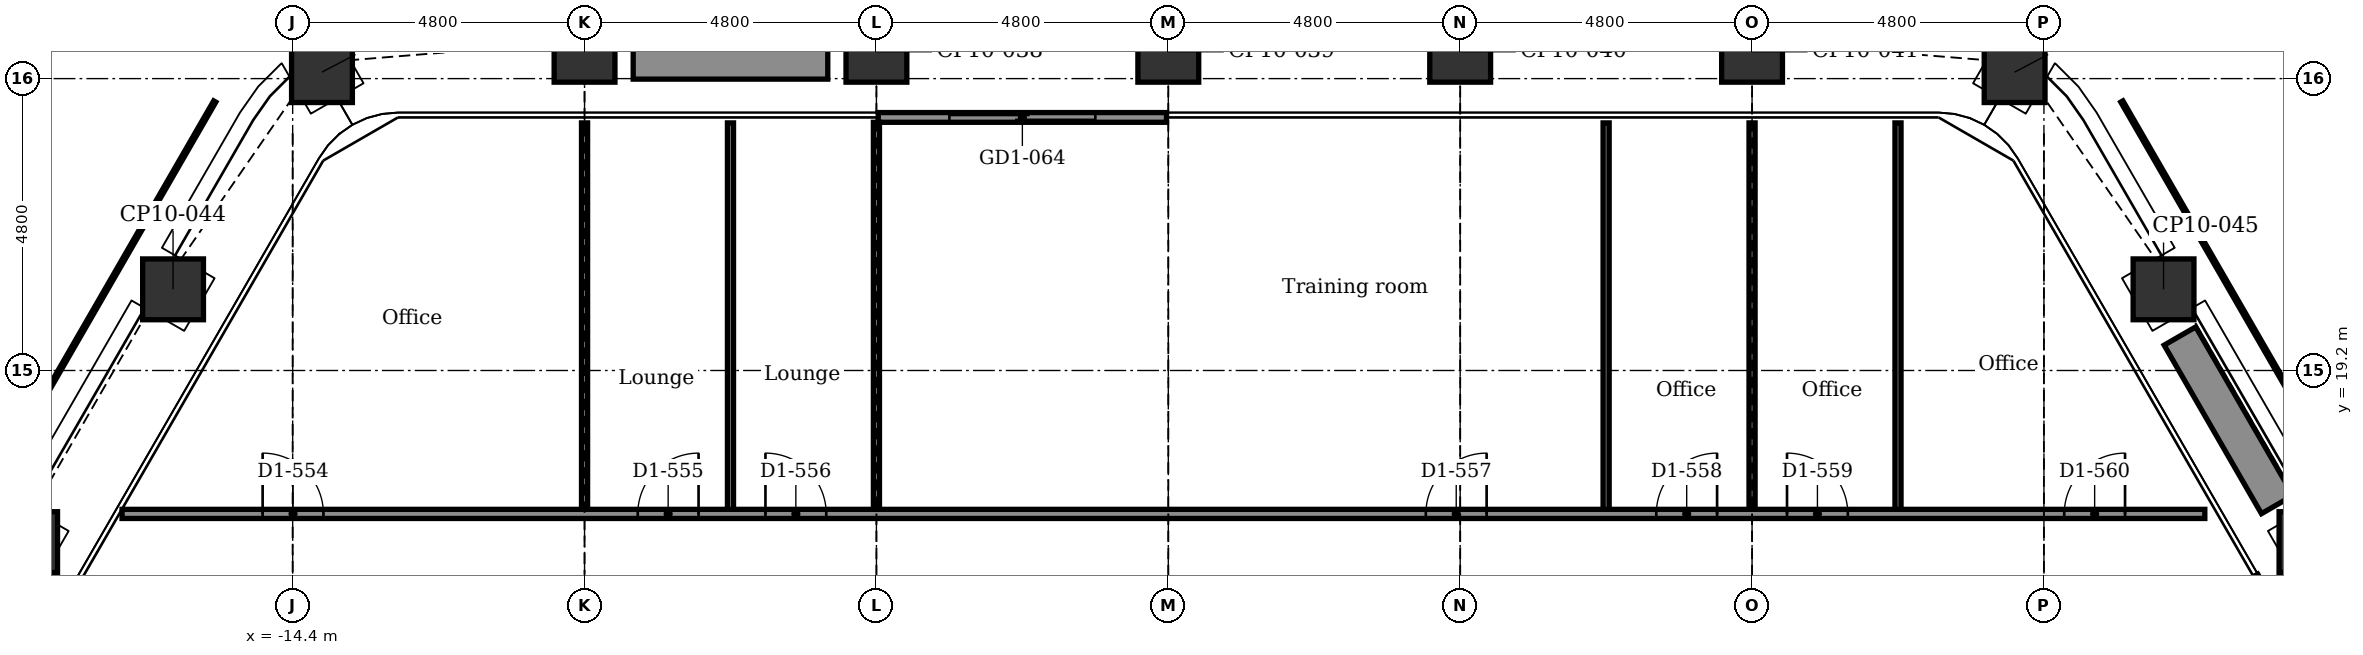
"""IFC4 building model, lengths in metres.
Left out: names, types, materials, properties, quantities, classifications, styles, units other than length and angle.
Written with IfcOpenShell. Run it as: python <this file> out.ifc"""

import sys

from ifc_helpers import new_model, si_unit, direction, frame, frame_2d, origin, origin_2d, place, context, subcontext, project, spatial, rectangle, extrude, element, fill, save


model = new_model("IFC4")
c1 = context("Model", 3, precision=1e-05, world=origin(), true_north=direction((0.0, 1.0)))
c2 = subcontext(c1, "Body", "Model", "MODEL_VIEW")
j1 = project(units=[si_unit("LENGTHUNIT", "METRE"), si_unit("PLANEANGLEUNIT", "RADIAN")], contexts=[c1])
p1 = place(None, origin())
s1 = spatial("IfcSite", under=j1, at=p1, CompositionType="ELEMENT")
p2 = place(p1, origin())
s2 = spatial("IfcBuilding", under=s1, at=p2, CompositionType="ELEMENT")
p3 = place(p2, frame((0.0, 0.0, 197.3)))
s3 = spatial("IfcBuildingStorey", under=s2, at=p3, CompositionType="ELEMENT", Elevation=197.3)
for number, where, z_axis, x_axis in (
    (1, (-13.918, 24.107, -0.15), (0.0, 0.0, 1.0), (0.866, 0.5, 0.0)),
    (2, (-9.6, 24.442, -0.15), (0.0, 0.0, 1.0), (1.0, 0.0, 0.0)),
    (3, (-4.8, 24.442, -0.15), (0.0, 0.0, 1.0), (1.0, 0.0, 0.0)),
    (4, (0.0, 24.442, -0.15), (0.0, 0.0, 1.0), (1.0, 0.0, 0.0)),
    (5, (4.8, 24.442, -0.15), (0.0, 0.0, 1.0), (1.0, 0.0, 0.0)),
    (6, (9.6, 24.442, -0.15), (0.0, 0.0, 1.0), (1.0, 0.0, 0.0)),
    (7, (13.918, 24.107, -0.15), (0.0, 0.0, 1.0), (0.5, 0.866, 0.0)),
    (8, (16.367, 20.535, -0.15), (0.0, 0.0, 1.0), (0.866, 0.5, 0.0)),
    (9, (18.767, 16.378, -0.15), (0.0, 0.0, 1.0), (0.866, 0.5, 0.0)),
    (10, (-18.767, 16.378, -0.15), (0.0, 0.0, 1.0), (0.5, 0.866, 0.0)),
    (11, (-16.367, 20.535, -0.15), (0.0, 0.0, 1.0), (0.5, 0.866, 0.0)),
):
    element("IfcColumn", number, at=place(p3, frame(where, z_axis=z_axis, x_axis=x_axis)), inside=s3, PredefinedType="COLUMN", context=c2, shape_type="SweptSolid", body=[
        extrude(rectangle(XDim=1.0, YDim=1.0, at=origin_2d()), origin(), (0.0, 0.0, 1.0), 3.9),
    ])
p4 = place(p3, frame((-4.77, 23.362, 0.0), z_axis=(0.0, 0.0, 1.0), x_axis=(1.0, 0.0, 0.0)))
e12 = element("IfcWall", 12, at=p4, inside=s3, PredefinedType="PARTITIONING", context=c2, shape_type="SweptSolid", body=[
    extrude(rectangle(XDim=4.74, YDim=0.16, at=frame_2d((2.37, 0.0))), origin(), (0.0, 0.0, 1.0), 3.75),
])
p5 = place(p4, frame((1.17, 0.0, 0.0)))
e13 = element("IfcOpeningElement", 13, at=p5, cuts=e12, PredefinedType="OPENING", context=c2, shape_type="SweptSolid", body=[
    extrude(rectangle(XDim=2.4, YDim=2.4, at=frame_2d((1.2, 1.2))), frame((0.0, 0.09, 0.0), z_axis=(0.0, -1.0, 0.0), x_axis=(1.0, 0.0, 0.0)), (0.0, 0.0, 1.0), 0.18),
])
p6 = place(p3, frame((17.847, 15.812, 0.0), z_axis=(0.0, 0.0, 1.0), x_axis=(0.5000167099, -0.866015756104, 0.0)))
e14 = element("IfcWall", 14, at=p6, inside=s3, PredefinedType="PARTITIONING", context=c2, shape_type="SweptSolid", body=[
    extrude(rectangle(XDim=4.74, YDim=0.16, at=frame_2d((2.37, 0.0))), origin(), (0.0, 0.0, 1.0), 3.75),
])
p7 = place(p6, frame((1.17, 0.0, 0.0)))
e15 = element("IfcOpeningElement", 15, at=p7, cuts=e14, PredefinedType="OPENING", context=c2, shape_type="SweptSolid", body=[
    extrude(rectangle(XDim=2.4, YDim=2.4, at=frame_2d((1.2, 1.2))), frame((0.0, 0.09, 0.0), z_axis=(0.0, -1.0, 0.0), x_axis=(1.0, 0.0, 0.0)), (0.0, 0.0, 1.0), 0.18),
])
for number, where, z_axis, x_axis in (
    (16, (-8.8, 24.292, 0.0), (0.0, 0.0, 1.0), (1.0, 0.0, 0.0)),
    (17, (16.637, 19.767, 0.0), (0.0, 0.0, 1.0), (0.5, -0.866, 0.0)),
):
    element("IfcWall", number, at=place(p3, frame(where, z_axis=z_axis, x_axis=x_axis)), inside=s3, PredefinedType="USERDEFINED", context=c2, shape_type="SweptSolid", body=[
        extrude(rectangle(XDim=3.2, YDim=0.6, at=frame_2d((1.6, 0.0))), origin(), (0.0, 0.0, 1.0), 0.7),
    ])
p8 = place(p3, frame((12.0, 16.842, 0.0), z_axis=(0.0, 0.0, 1.0), x_axis=(0.0, 1.0, 0.0)))
e18 = element("IfcWall", 18, at=p8, inside=s3, PredefinedType="PARTITIONING", context=c2, shape_type="SweptSolid", body=[
    extrude(rectangle(XDim=6.43, YDim=0.1, at=frame_2d((3.215, 0.0))), origin(), (0.0, 0.0, 1.0), 3.75),
])
p9 = place(p3, frame((9.6, 16.842, 0.0), z_axis=(0.0, 0.0, 1.0), x_axis=(0.0, 1.0, 0.0)))
e19 = element("IfcWall", 19, at=p9, inside=s3, PredefinedType="PARTITIONING", context=c2, shape_type="SweptSolid", body=[
    extrude(rectangle(XDim=6.43, YDim=0.1, at=frame_2d((3.215, 0.0))), origin(), (0.0, 0.0, 1.0), 3.066),
])
p10 = place(p3, frame((7.2, 16.842, 0.0), z_axis=(0.0, 0.0, 1.0), x_axis=(0.0, 1.0, 0.0)))
e20 = element("IfcWall", 20, at=p10, inside=s3, PredefinedType="PARTITIONING", context=c2, shape_type="SweptSolid", body=[
    extrude(rectangle(XDim=6.43, YDim=0.1, at=frame_2d((3.215, 0.0))), origin(), (0.0, 0.0, 1.0), 3.75),
])
p11 = place(p3, frame((-4.8, 16.842, 0.0), z_axis=(0.0, 0.0, 1.0), x_axis=(0.0, 1.0, 0.0)))
e21 = element("IfcWall", 21, at=p11, inside=s3, PredefinedType="PARTITIONING", context=c2, shape_type="SweptSolid", body=[
    extrude(rectangle(XDim=6.44, YDim=0.1, at=frame_2d((3.22, 0.0))), origin(), (0.0, 0.0, 1.0), 3.066),
])
p12 = place(p3, frame((-7.2, 16.842, 0.0), z_axis=(0.0, 0.0, 1.0), x_axis=(0.0, 1.0, 0.0)))
e22 = element("IfcWall", 22, at=p12, inside=s3, PredefinedType="PARTITIONING", context=c2, shape_type="SweptSolid", body=[
    extrude(rectangle(XDim=6.43, YDim=0.1, at=frame_2d((3.215, 0.0))), origin(), (0.0, 0.0, 1.0), 3.75),
])
p13 = place(p3, frame((-9.6, 16.842, 0.0), z_axis=(0.0, 0.0, 1.0), x_axis=(0.0, 1.0, 0.0)))
e23 = element("IfcWall", 23, at=p13, inside=s3, PredefinedType="PARTITIONING", context=c2, shape_type="SweptSolid", body=[
    extrude(rectangle(XDim=6.43, YDim=0.1, at=frame_2d((3.215, 0.0))), origin(), (0.0, 0.0, 1.0), 3.066),
])
p14 = place(p3, frame((-17.206, 16.842, 0.0), z_axis=(0.0, 0.0, 1.0), x_axis=(1.0, 0.0, 0.0)))
e24 = element("IfcWall", 24, at=p14, inside=s3, PredefinedType="PARTITIONING", context=c2, shape_type="SweptSolid", body=[
    extrude(rectangle(XDim=34.252, YDim=0.15, at=frame_2d((17.126, 0.0))), origin(), (0.0, 0.0, 1.0), 3.75),
])
p15 = place(p14, frame((2.312, 0.0, 0.0)))
e25 = element("IfcOpeningElement", 25, at=p15, cuts=e24, PredefinedType="OPENING", context=c2, shape_type="SweptSolid", body=[
    extrude(rectangle(XDim=1.0, YDim=2.1, at=frame_2d((0.5, 1.05))), frame((0.0, 0.085, 0.0), z_axis=(0.0, -1.0, 0.0), x_axis=(1.0, 0.0, 0.0)), (0.0, 0.0, 1.0), 0.17),
])
p16 = place(p14, frame((8.481, 0.0, 0.0)))
e26 = element("IfcOpeningElement", 26, at=p16, cuts=e24, PredefinedType="OPENING", context=c2, shape_type="SweptSolid", body=[
    extrude(rectangle(XDim=1.0, YDim=2.1, at=frame_2d((0.5, 1.05))), frame((0.0, 0.085, 0.0), z_axis=(0.0, -1.0, 0.0), x_axis=(1.0, 0.0, 0.0)), (0.0, 0.0, 1.0), 0.17),
])
p17 = place(p14, frame((10.581, 0.0, 0.0)))
e27 = element("IfcOpeningElement", 27, at=p17, cuts=e24, PredefinedType="OPENING", context=c2, shape_type="SweptSolid", body=[
    extrude(rectangle(XDim=1.0, YDim=2.1, at=frame_2d((0.5, 1.05))), frame((0.0, 0.085, 0.0), z_axis=(0.0, -1.0, 0.0), x_axis=(1.0, 0.0, 0.0)), (0.0, 0.0, 1.0), 0.17),
])
p18 = place(p14, frame((21.441, 0.0, 0.0)))
e28 = element("IfcOpeningElement", 28, at=p18, cuts=e24, PredefinedType="OPENING", context=c2, shape_type="SweptSolid", body=[
    extrude(rectangle(XDim=1.0, YDim=2.1, at=frame_2d((0.5, 1.05))), frame((0.0, 0.085, 0.0), z_axis=(0.0, -1.0, 0.0), x_axis=(1.0, 0.0, 0.0)), (0.0, 0.0, 1.0), 0.17),
])
p19 = place(p14, frame((25.231, 0.0, 0.0)))
e29 = element("IfcOpeningElement", 29, at=p19, cuts=e24, PredefinedType="OPENING", context=c2, shape_type="SweptSolid", body=[
    extrude(rectangle(XDim=1.0, YDim=2.1, at=frame_2d((0.5, 1.05))), frame((0.0, 0.085, 0.0), z_axis=(0.0, -1.0, 0.0), x_axis=(1.0, 0.0, 0.0)), (0.0, 0.0, 1.0), 0.17),
])
p20 = place(p14, frame((27.381, 0.0, 0.0)))
e30 = element("IfcOpeningElement", 30, at=p20, cuts=e24, PredefinedType="OPENING", context=c2, shape_type="SweptSolid", body=[
    extrude(rectangle(XDim=1.0, YDim=2.1, at=frame_2d((0.5, 1.05))), frame((0.0, 0.085, 0.0), z_axis=(0.0, -1.0, 0.0), x_axis=(1.0, 0.0, 0.0)), (0.0, 0.0, 1.0), 0.17),
])
p21 = place(p14, frame((31.94, 0.0, 0.0)))
e31 = element("IfcOpeningElement", 31, at=p21, cuts=e24, PredefinedType="OPENING", context=c2, shape_type="SweptSolid", body=[
    extrude(rectangle(XDim=1.0, YDim=2.1, at=frame_2d((0.5, 1.05))), frame((0.0, 0.085, 0.0), z_axis=(0.0, -1.0, 0.0), x_axis=(1.0, 0.0, 0.0)), (0.0, 0.0, 1.0), 0.17),
])
p22 = place(p5, origin())
e32 = element("IfcDoor", 32, at=p22, inside=s3, OperationType="DOUBLE_DOOR_SLIDING", PredefinedType="DOOR", context=c2, shape_type="SweptSolid", body=[
    extrude(rectangle(XDim=2.4, YDim=2.4, at=frame_2d((1.2, 1.2))), frame((0.0, 0.025, 0.0), z_axis=(0.0, -1.0, 0.0), x_axis=(1.0, 0.0, 0.0)), (0.0, 0.0, 1.0), 0.05),
])
fill(e13, e32)
p23 = place(p15, origin())
e33 = element("IfcDoor", 33, at=p23, inside=s3, OperationType="SINGLE_SWING_LEFT", PredefinedType="DOOR", context=c2, shape_type="SweptSolid", body=[
    extrude(rectangle(XDim=1.0, YDim=2.1, at=frame_2d((0.5, 1.05))), frame((0.0, 0.025, 0.0), z_axis=(0.0, -1.0, 0.0), x_axis=(1.0, 0.0, 0.0)), (0.0, 0.0, 1.0), 0.05),
])
fill(e25, e33)
p24 = place(p16, origin())
e34 = element("IfcDoor", 34, at=p24, inside=s3, OperationType="SINGLE_SWING_RIGHT", PredefinedType="DOOR", context=c2, shape_type="SweptSolid", body=[
    extrude(rectangle(XDim=1.0, YDim=2.1, at=frame_2d((0.5, 1.05))), frame((0.0, 0.025, 0.0), z_axis=(0.0, -1.0, 0.0), x_axis=(1.0, 0.0, 0.0)), (0.0, 0.0, 1.0), 0.05),
])
fill(e26, e34)
p25 = place(p17, origin())
e35 = element("IfcDoor", 35, at=p25, inside=s3, OperationType="SINGLE_SWING_LEFT", PredefinedType="DOOR", context=c2, shape_type="SweptSolid", body=[
    extrude(rectangle(XDim=1.0, YDim=2.1, at=frame_2d((0.5, 1.05))), frame((0.0, 0.025, 0.0), z_axis=(0.0, -1.0, 0.0), x_axis=(1.0, 0.0, 0.0)), (0.0, 0.0, 1.0), 0.05),
])
fill(e27, e35)
p26 = place(p18, origin())
e36 = element("IfcDoor", 36, at=p26, inside=s3, OperationType="SINGLE_SWING_RIGHT", PredefinedType="DOOR", context=c2, shape_type="SweptSolid", body=[
    extrude(rectangle(XDim=1.0, YDim=2.1, at=frame_2d((0.5, 1.05))), frame((0.0, 0.025, 0.0), z_axis=(0.0, -1.0, 0.0), x_axis=(1.0, 0.0, 0.0)), (0.0, 0.0, 1.0), 0.05),
])
fill(e28, e36)
p27 = place(p19, origin())
e37 = element("IfcDoor", 37, at=p27, inside=s3, OperationType="SINGLE_SWING_RIGHT", PredefinedType="DOOR", context=c2, shape_type="SweptSolid", body=[
    extrude(rectangle(XDim=1.0, YDim=2.1, at=frame_2d((0.5, 1.05))), frame((0.0, 0.025, 0.0), z_axis=(0.0, -1.0, 0.0), x_axis=(1.0, 0.0, 0.0)), (0.0, 0.0, 1.0), 0.05),
])
fill(e29, e37)
p28 = place(p20, origin())
e38 = element("IfcDoor", 38, at=p28, inside=s3, OperationType="SINGLE_SWING_LEFT", PredefinedType="DOOR", context=c2, shape_type="SweptSolid", body=[
    extrude(rectangle(XDim=1.0, YDim=2.1, at=frame_2d((0.5, 1.05))), frame((0.0, 0.025, 0.0), z_axis=(0.0, -1.0, 0.0), x_axis=(1.0, 0.0, 0.0)), (0.0, 0.0, 1.0), 0.05),
])
fill(e30, e38)
p29 = place(p21, origin())
e39 = element("IfcDoor", 39, at=p29, inside=s3, OperationType="SINGLE_SWING_RIGHT", PredefinedType="DOOR", context=c2, shape_type="SweptSolid", body=[
    extrude(rectangle(XDim=1.0, YDim=2.1, at=frame_2d((0.5, 1.05))), frame((0.0, 0.025, 0.0), z_axis=(0.0, -1.0, 0.0), x_axis=(1.0, 0.0, 0.0)), (0.0, 0.0, 1.0), 0.05),
])
fill(e31, e39)
save(model, sys.argv[1])
